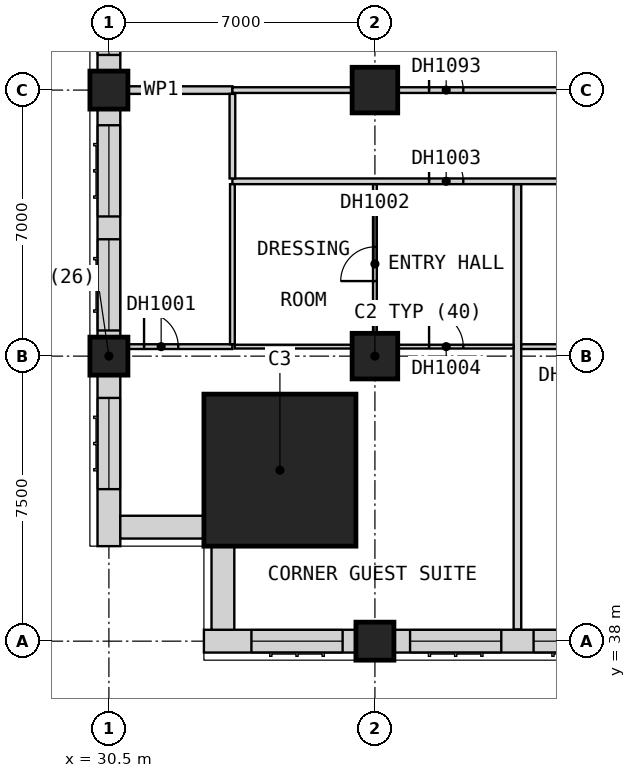
"""IFC4 building model, lengths in metres.
Left out: names, types, materials, properties, quantities, classifications, styles, units other than length and angle.
Written with IfcOpenShell. Run it as: python <this file> out.ifc"""

import sys

from ifc_helpers import new_model, si_unit, direction, frame, frame_2d, origin, origin_2d, place, context, subcontext, project, spatial, rectangle, extrude, element, fill, save


model = new_model("IFC4")
c1 = context("Model", 3, precision=1e-05, world=origin(), true_north=direction((0.0, 1.0)))
c2 = subcontext(c1, "Body", "Model", "MODEL_VIEW")
j1 = project(units=[si_unit("LENGTHUNIT", "METRE"), si_unit("PLANEANGLEUNIT", "RADIAN")], contexts=[c1])
p1 = place(None, origin())
s1 = spatial("IfcSite", under=j1, at=p1, CompositionType="ELEMENT")
p2 = place(p1, origin())
s2 = spatial("IfcBuilding", under=s1, at=p2, CompositionType="ELEMENT")
p3 = place(p2, frame((0.0, 0.0, 48.4)))
s3 = spatial("IfcBuildingStorey", under=s2, at=p3, CompositionType="ELEMENT", Elevation=48.4)
for number, where, z_axis, x_axis in (
    (1, (30.5, 45.5, 0.0), (0.0, 0.0, 1.0), (1.0, 0.0, 0.0)),
    (2, (30.5, 52.5, 0.0), (0.0, 0.0, 1.0), (1.0, 0.0, 0.0)),
    (3, (37.5, 38.0, 0.0), (0.0, 0.0, 1.0), (1.0, 0.0, 0.0)),
):
    element("IfcColumn", number, at=place(p3, frame(where, z_axis=z_axis, x_axis=x_axis)), inside=s3, PredefinedType="COLUMN", context=c2, shape_type="SweptSolid", body=[
        extrude(rectangle(XDim=1.0, YDim=1.0, at=origin_2d()), origin(), (0.0, 0.0, 1.0), 3.6),
    ])
for number, where, z_axis, x_axis in (
    (4, (37.5, 45.5, 0.0), (0.0, 0.0, 1.0), (1.0, 0.0, 0.0)),
    (5, (37.5, 52.5, 0.0), (0.0, 0.0, 1.0), (1.0, 0.0, 0.0)),
):
    element("IfcColumn", number, at=place(p3, frame(where, z_axis=z_axis, x_axis=x_axis)), inside=s3, PredefinedType="COLUMN", context=c2, shape_type="SweptSolid", body=[
        extrude(rectangle(XDim=1.2, YDim=1.2, at=origin_2d()), origin(), (0.0, 0.0, 1.0), 3.6),
    ])
p4 = place(p3, frame((35.0, 42.5, 0.0), z_axis=(0.0, 0.0, 1.0), x_axis=(1.0, 0.0, 0.0)))
e6 = element("IfcColumn", 6, at=p4, inside=s3, PredefinedType="COLUMN", context=c2, shape_type="SweptSolid", body=[
    extrude(rectangle(XDim=4.0, YDim=4.0, at=origin_2d()), origin(), (0.0, 0.0, 1.0), 3.6),
])
p5 = place(p3, frame((33.0, 38.0, 0.0), z_axis=(0.0, 0.0, 1.0), x_axis=(1.0, 0.0, 0.0)))
e7 = element("IfcWall", 7, at=p5, inside=s3, PredefinedType="SOLIDWALL", context=c2, shape_type="SweptSolid", body=[
    extrude(rectangle(XDim=4.0, YDim=0.6, at=frame_2d((2.0, 0.0))), origin(), (0.0, 0.0, 1.0), 3.35),
])
p6 = place(p5, frame((1.25, 0.0, 0.8)))
e8 = element("IfcOpeningElement", 8, at=p6, cuts=e7, PredefinedType="OPENING", context=c2, shape_type="SweptSolid", body=[
    extrude(rectangle(XDim=2.4, YDim=1.8, at=frame_2d((1.2, 0.9))), frame((0.0, 0.31, 0.0), z_axis=(0.0, -1.0, 0.0), x_axis=(1.0, 0.0, 0.0)), (0.0, 0.0, 1.0), 0.62),
])
p7 = place(p3, frame((38.0, 38.0, 0.0), z_axis=(0.0, 0.0, 1.0), x_axis=(1.0, 0.0, 0.0)))
e9 = element("IfcWall", 9, at=p7, inside=s3, PredefinedType="SOLIDWALL", context=c2, shape_type="SweptSolid", body=[
    extrude(rectangle(XDim=6.5, YDim=0.6, at=frame_2d((3.25, 0.0))), origin(), (0.0, 0.0, 1.0), 2.85),
])
p8 = place(p7, frame((0.425, 0.0, 0.8)))
e10 = element("IfcOpeningElement", 10, at=p8, cuts=e9, PredefinedType="OPENING", context=c2, shape_type="SweptSolid", body=[
    extrude(rectangle(XDim=2.4, YDim=1.8, at=frame_2d((1.2, 0.9))), frame((0.0, 0.31, 0.0), z_axis=(0.0, -1.0, 0.0), x_axis=(1.0, 0.0, 0.0)), (0.0, 0.0, 1.0), 0.62),
])
p9 = place(p7, frame((3.675, 0.0, 0.8)))
e11 = element("IfcOpeningElement", 11, at=p9, cuts=e9, PredefinedType="OPENING", context=c2, shape_type="SweptSolid", body=[
    extrude(rectangle(XDim=2.4, YDim=1.8, at=frame_2d((1.2, 0.9))), frame((0.0, 0.31, 0.0), z_axis=(0.0, -1.0, 0.0), x_axis=(1.0, 0.0, 0.0)), (0.0, 0.0, 1.0), 0.62),
])
p10 = place(p3, frame((30.5, 60.0, 0.0), z_axis=(0.0, 0.0, 1.0), x_axis=(0.0, -1.0, 0.0)))
e12 = element("IfcWall", 12, at=p10, inside=s3, PredefinedType="SOLIDWALL", context=c2, shape_type="SweptSolid", body=[
    extrude(rectangle(XDim=7.0, YDim=0.6, at=frame_2d((3.5, 0.0))), origin(), (0.0, 0.0, 1.0), 3.35),
])
p11 = place(p10, frame((4.175, 0.0, 0.8)))
e13 = element("IfcOpeningElement", 13, at=p11, cuts=e12, PredefinedType="OPENING", context=c2, shape_type="SweptSolid", body=[
    extrude(rectangle(XDim=2.4, YDim=1.8, at=frame_2d((1.2, 0.9))), frame((0.0, 0.31, 0.0), z_axis=(0.0, -1.0, 0.0), x_axis=(1.0, 0.0, 0.0)), (0.0, 0.0, 1.0), 0.62),
])
p12 = place(p10, frame((0.675, 0.0, 0.8)))
e14 = element("IfcOpeningElement", 14, at=p12, cuts=e12, PredefinedType="OPENING", context=c2, shape_type="SweptSolid", body=[
    extrude(rectangle(XDim=2.4, YDim=1.8, at=frame_2d((1.2, 0.9))), frame((0.0, 0.31, 0.0), z_axis=(0.0, -1.0, 0.0), x_axis=(1.0, 0.0, 0.0)), (0.0, 0.0, 1.0), 0.62),
])
p13 = place(p3, frame((30.5, 52.0, 0.0), z_axis=(0.0, 0.0, 1.0), x_axis=(0.0, -1.0, 0.0)))
e15 = element("IfcWall", 15, at=p13, inside=s3, PredefinedType="SOLIDWALL", context=c2, shape_type="SweptSolid", body=[
    extrude(rectangle(XDim=6.0, YDim=0.6, at=frame_2d((3.0, 0.0))), origin(), (0.0, 0.0, 1.0), 2.85),
])
p14 = place(p13, frame((3.425, 0.0, 0.8)))
e16 = element("IfcOpeningElement", 16, at=p14, cuts=e15, PredefinedType="OPENING", context=c2, shape_type="SweptSolid", body=[
    extrude(rectangle(XDim=2.4, YDim=1.8, at=frame_2d((1.2, 0.9))), frame((0.0, 0.31, 0.0), z_axis=(0.0, -1.0, 0.0), x_axis=(1.0, 0.0, 0.0)), (0.0, 0.0, 1.0), 0.62),
])
p15 = place(p13, frame((0.425, 0.0, 0.8)))
e17 = element("IfcOpeningElement", 17, at=p15, cuts=e15, PredefinedType="OPENING", context=c2, shape_type="SweptSolid", body=[
    extrude(rectangle(XDim=2.4, YDim=1.8, at=frame_2d((1.2, 0.9))), frame((0.0, 0.31, 0.0), z_axis=(0.0, -1.0, 0.0), x_axis=(1.0, 0.0, 0.0)), (0.0, 0.0, 1.0), 0.62),
])
p16 = place(p3, frame((30.5, 45.0, 0.0), z_axis=(0.0, 0.0, 1.0), x_axis=(0.0, -1.0, 0.0)))
e18 = element("IfcWall", 18, at=p16, inside=s3, PredefinedType="SOLIDWALL", context=c2, shape_type="SweptSolid", body=[
    extrude(rectangle(XDim=4.5, YDim=0.6, at=frame_2d((2.25, 0.0))), origin(), (0.0, 0.0, 1.0), 3.35),
])
p17 = place(p16, frame((0.6, 0.0, 0.8)))
e19 = element("IfcOpeningElement", 19, at=p17, cuts=e18, PredefinedType="OPENING", context=c2, shape_type="SweptSolid", body=[
    extrude(rectangle(XDim=2.4, YDim=1.8, at=frame_2d((1.2, 0.9))), frame((0.0, 0.31, 0.0), z_axis=(0.0, -1.0, 0.0), x_axis=(1.0, 0.0, 0.0)), (0.0, 0.0, 1.0), 0.62),
])
for number, where, z_axis, x_axis in (
    (20, (30.8, 41.0, 0.0), (0.0, 0.0, 1.0), (1.0, 0.0, 0.0)),
    (21, (33.5, 40.5, 0.0), (0.0, 0.0, 1.0), (0.0, -1.0, 0.0)),
):
    element("IfcWall", number, at=place(p3, frame(where, z_axis=z_axis, x_axis=x_axis)), inside=s3, PredefinedType="SOLIDWALL", context=c2, shape_type="SweptSolid", body=[
        extrude(rectangle(XDim=2.2, YDim=0.6, at=frame_2d((1.1, 0.0))), origin(), (0.0, 0.0, 1.0), 3.35),
    ])
p18 = place(p3, frame((30.0, 52.5, 0.0), z_axis=(0.0, 0.0, 1.0), x_axis=(1.0, 0.0, 0.0)))
e22 = element("IfcWall", 22, at=p18, inside=s3, PredefinedType="PARTITIONING", context=c2, shape_type="SweptSolid", body=[
    extrude(rectangle(XDim=3.75, YDim=0.2, at=frame_2d((1.875, 0.0))), origin(), (0.0, 0.0, 1.0), 3.35),
])
p19 = place(p3, frame((41.25, 38.31, 0.0), z_axis=(0.0, 0.0, 1.0), x_axis=(0.0, 1.0, 0.0)))
e23 = element("IfcWall", 23, at=p19, inside=s3, PredefinedType="PARTITIONING", context=c2, shape_type="SweptSolid", body=[
    extrude(rectangle(XDim=11.715, YDim=0.2, at=frame_2d((5.857, 0.0))), origin(), (0.0, 0.0, 1.0), 3.35),
])
p20 = place(p3, frame((33.75, 50.1, 0.0), z_axis=(0.0, 0.0, 1.0), x_axis=(1.0, 0.0, 0.0)))
e24 = element("IfcWall", 24, at=p20, inside=s3, PredefinedType="PARTITIONING", context=c2, shape_type="SweptSolid", body=[
    extrude(rectangle(XDim=43.65, YDim=0.15, at=frame_2d((21.825, 0.0))), origin(), (0.0, 0.0, 1.0), 3.35),
])
p21 = place(p20, frame((5.175, 0.0, 0.0)))
e25 = element("IfcOpeningElement", 25, at=p21, cuts=e24, PredefinedType="OPENING", context=c2, shape_type="SweptSolid", body=[
    extrude(rectangle(XDim=0.9, YDim=2.1, at=frame_2d((0.45, 1.05))), frame((0.0, 0.085, 0.0), z_axis=(0.0, -1.0, 0.0), x_axis=(1.0, 0.0, 0.0)), (0.0, 0.0, 1.0), 0.17),
])
p22 = place(p20, frame((13.05, 0.0, 0.0)))
e26 = element("IfcOpeningElement", 26, at=p22, cuts=e24, PredefinedType="OPENING", context=c2, shape_type="SweptSolid", body=[
    extrude(rectangle(XDim=0.9, YDim=2.1, at=frame_2d((0.45, 1.05))), frame((0.0, 0.085, 0.0), z_axis=(0.0, -1.0, 0.0), x_axis=(1.0, 0.0, 0.0)), (0.0, 0.0, 1.0), 0.17),
])
p23 = place(p20, frame((17.363, 0.0, 0.0)))
e27 = element("IfcOpeningElement", 27, at=p23, cuts=e24, PredefinedType="OPENING", context=c2, shape_type="SweptSolid", body=[
    extrude(rectangle(XDim=0.9, YDim=2.1, at=frame_2d((0.45, 1.05))), frame((0.0, 0.085, 0.0), z_axis=(0.0, -1.0, 0.0), x_axis=(1.0, 0.0, 0.0)), (0.0, 0.0, 1.0), 0.17),
])
p24 = place(p20, frame((21.113, 0.0, 0.0)))
e28 = element("IfcOpeningElement", 28, at=p24, cuts=e24, PredefinedType="OPENING", context=c2, shape_type="SweptSolid", body=[
    extrude(rectangle(XDim=0.9, YDim=2.1, at=frame_2d((0.45, 1.05))), frame((0.0, 0.085, 0.0), z_axis=(0.0, -1.0, 0.0), x_axis=(1.0, 0.0, 0.0)), (0.0, 0.0, 1.0), 0.17),
])
p25 = place(p20, frame((24.863, 0.0, 0.0)))
e29 = element("IfcOpeningElement", 29, at=p25, cuts=e24, PredefinedType="OPENING", context=c2, shape_type="SweptSolid", body=[
    extrude(rectangle(XDim=0.9, YDim=2.1, at=frame_2d((0.45, 1.05))), frame((0.0, 0.085, 0.0), z_axis=(0.0, -1.0, 0.0), x_axis=(1.0, 0.0, 0.0)), (0.0, 0.0, 1.0), 0.17),
])
p26 = place(p20, frame((28.613, 0.0, 0.0)))
e30 = element("IfcOpeningElement", 30, at=p26, cuts=e24, PredefinedType="OPENING", context=c2, shape_type="SweptSolid", body=[
    extrude(rectangle(XDim=0.9, YDim=2.1, at=frame_2d((0.45, 1.05))), frame((0.0, 0.085, 0.0), z_axis=(0.0, -1.0, 0.0), x_axis=(1.0, 0.0, 0.0)), (0.0, 0.0, 1.0), 0.17),
])
p27 = place(p20, frame((32.363, 0.0, 0.0)))
e31 = element("IfcOpeningElement", 31, at=p27, cuts=e24, PredefinedType="OPENING", context=c2, shape_type="SweptSolid", body=[
    extrude(rectangle(XDim=0.9, YDim=2.1, at=frame_2d((0.45, 1.05))), frame((0.0, 0.085, 0.0), z_axis=(0.0, -1.0, 0.0), x_axis=(1.0, 0.0, 0.0)), (0.0, 0.0, 1.0), 0.17),
])
p28 = place(p20, frame((39.3, 0.0, 0.0)))
e32 = element("IfcOpeningElement", 32, at=p28, cuts=e24, PredefinedType="OPENING", context=c2, shape_type="SweptSolid", body=[
    extrude(rectangle(XDim=0.9, YDim=2.1, at=frame_2d((0.45, 1.05))), frame((0.0, 0.085, 0.0), z_axis=(0.0, -1.0, 0.0), x_axis=(1.0, 0.0, 0.0)), (0.0, 0.0, 1.0), 0.17),
])
p29 = place(p20, frame((42.0, 0.0, 0.0)))
e33 = element("IfcOpeningElement", 33, at=p29, cuts=e24, PredefinedType="OPENING", context=c2, shape_type="SweptSolid", body=[
    extrude(rectangle(XDim=0.9, YDim=2.1, at=frame_2d((0.45, 1.05))), frame((0.0, 0.085, 0.0), z_axis=(0.0, -1.0, 0.0), x_axis=(1.0, 0.0, 0.0)), (0.0, 0.0, 1.0), 0.17),
])
p30 = place(p3, frame((33.75, 52.5, 0.0), z_axis=(0.0, 0.0, 1.0), x_axis=(1.0, 0.0, 0.0)))
e34 = element("IfcWall", 34, at=p30, inside=s3, PredefinedType="PARTITIONING", context=c2, shape_type="SweptSolid", body=[
    extrude(rectangle(XDim=17.15, YDim=0.15, at=frame_2d((8.575, 0.0))), origin(), (0.0, 0.0, 1.0), 3.35),
])
p31 = place(p30, frame((5.175, 0.0, 0.0)))
e35 = element("IfcOpeningElement", 35, at=p31, cuts=e34, PredefinedType="OPENING", context=c2, shape_type="SweptSolid", body=[
    extrude(rectangle(XDim=0.9, YDim=2.1, at=frame_2d((0.45, 1.05))), frame((0.0, 0.085, 0.0), z_axis=(0.0, -1.0, 0.0), x_axis=(1.0, 0.0, 0.0)), (0.0, 0.0, 1.0), 0.17),
])
p32 = place(p30, frame((13.75, 0.0, 0.0)))
e36 = element("IfcOpeningElement", 36, at=p32, cuts=e34, PredefinedType="OPENING", context=c2, shape_type="SweptSolid", body=[
    extrude(rectangle(XDim=0.9, YDim=2.1, at=frame_2d((0.45, 1.05))), frame((0.0, 0.085, 0.0), z_axis=(0.0, -1.0, 0.0), x_axis=(1.0, 0.0, 0.0)), (0.0, 0.0, 1.0), 0.17),
])
p33 = place(p3, frame((33.75, 50.175, 0.0), z_axis=(0.0, 0.0, 1.0), x_axis=(0.0, 1.0, 0.0)))
e37 = element("IfcWall", 37, at=p33, inside=s3, PredefinedType="PARTITIONING", context=c2, shape_type="SweptSolid", body=[
    extrude(rectangle(XDim=2.225, YDim=0.15, at=frame_2d((1.112, 0.0))), origin(), (0.0, 0.0, 1.0), 3.35),
])
p34 = place(p3, frame((33.812, 45.75, 0.0), z_axis=(0.0, 0.0, 1.0), x_axis=(1.0, 0.0, 0.0)))
e38 = element("IfcWall", 38, at=p34, inside=s3, PredefinedType="PARTITIONING", context=c2, shape_type="SweptSolid", body=[
    extrude(rectangle(XDim=7.337, YDim=0.1, at=frame_2d((3.669, 0.0))), origin(), (0.0, 0.0, 1.0), 3.35),
])
p35 = place(p34, frame((5.113, 0.0, 0.0)))
e39 = element("IfcOpeningElement", 39, at=p35, cuts=e38, PredefinedType="OPENING", context=c2, shape_type="SweptSolid", body=[
    extrude(rectangle(XDim=0.9, YDim=2.1, at=frame_2d((0.45, 1.05))), frame((0.0, 0.06, 0.0), z_axis=(0.0, -1.0, 0.0), x_axis=(1.0, 0.0, 0.0)), (0.0, 0.0, 1.0), 0.12),
])
p36 = place(p3, frame((37.5, 45.8, 0.0), z_axis=(0.0, 0.0, 1.0), x_axis=(0.0, 1.0, 0.0)))
e40 = element("IfcWall", 40, at=p36, inside=s3, PredefinedType="PARTITIONING", context=c2, shape_type="SweptSolid", body=[
    extrude(rectangle(XDim=4.225, YDim=0.1, at=frame_2d((2.112, 0.0))), origin(), (0.0, 0.0, 1.0), 3.35),
])
p37 = place(p36, frame((1.675, 0.0, 0.0)))
e41 = element("IfcOpeningElement", 41, at=p37, cuts=e40, PredefinedType="OPENING", context=c2, shape_type="SweptSolid", body=[
    extrude(rectangle(XDim=0.9, YDim=2.1, at=frame_2d((0.45, 1.05))), frame((0.0, 0.06, 0.0), z_axis=(0.0, -1.0, 0.0), x_axis=(1.0, 0.0, 0.0)), (0.0, 0.0, 1.0), 0.12),
])
p38 = place(p3, frame((30.0, 45.75, 0.0), z_axis=(0.0, 0.0, 1.0), x_axis=(1.0, 0.0, 0.0)))
e42 = element("IfcWall", 42, at=p38, inside=s3, PredefinedType="PARTITIONING", context=c2, shape_type="SweptSolid", body=[
    extrude(rectangle(XDim=3.75, YDim=0.125, at=frame_2d((1.875, 0.0))), origin(), (0.0, 0.0, 1.0), 3.35),
])
p39 = place(p38, frame((1.425, 0.0, 0.0)))
e43 = element("IfcOpeningElement", 43, at=p39, cuts=e42, PredefinedType="OPENING", context=c2, shape_type="SweptSolid", body=[
    extrude(rectangle(XDim=0.9, YDim=2.1, at=frame_2d((0.45, 1.05))), frame((0.0, 0.073, 0.0), z_axis=(0.0, -1.0, 0.0), x_axis=(1.0, 0.0, 0.0)), (0.0, 0.0, 1.0), 0.145),
])
p40 = place(p3, frame((41.35, 45.75, 0.0), z_axis=(0.0, 0.0, 1.0), x_axis=(1.0, 0.0, 0.0)))
e44 = element("IfcWall", 44, at=p40, inside=s3, PredefinedType="PARTITIONING", context=c2, shape_type="SweptSolid", body=[
    extrude(rectangle(XDim=4.4, YDim=0.125, at=frame_2d((2.2, 0.0))), origin(), (0.0, 0.0, 1.0), 3.35),
])
p41 = place(p40, frame((1.7, 0.0, 0.0)))
e45 = element("IfcOpeningElement", 45, at=p41, cuts=e44, PredefinedType="OPENING", context=c2, shape_type="SweptSolid", body=[
    extrude(rectangle(XDim=0.9, YDim=2.1, at=frame_2d((0.45, 1.05))), frame((0.0, 0.073, 0.0), z_axis=(0.0, -1.0, 0.0), x_axis=(1.0, 0.0, 0.0)), (0.0, 0.0, 1.0), 0.145),
])
p42 = place(p3, frame((33.75, 45.812, 0.0), z_axis=(0.0, 0.0, 1.0), x_axis=(0.0, 1.0, 0.0)))
e46 = element("IfcWall", 46, at=p42, inside=s3, PredefinedType="PARTITIONING", context=c2, shape_type="SweptSolid", body=[
    extrude(rectangle(XDim=4.212, YDim=0.125, at=frame_2d((2.106, 0.0))), origin(), (0.0, 0.0, 1.0), 3.35),
])
p43 = place(p6, origin())
e47 = element("IfcWindow", 47, at=p43, inside=s3, PartitioningType="SINGLE_PANEL", PredefinedType="WINDOW", context=c2, shape_type="SweptSolid", body=[
    extrude(rectangle(XDim=2.4, YDim=1.8, at=frame_2d((1.2, 0.9))), frame((0.0, -0.07, 0.0), z_axis=(0.0, -1.0, 0.0), x_axis=(1.0, 0.0, 0.0)), (0.0, 0.0, 1.0), 0.06),
])
fill(e8, e47)
p44 = place(p8, origin())
e48 = element("IfcWindow", 48, at=p44, inside=s3, PartitioningType="SINGLE_PANEL", PredefinedType="WINDOW", context=c2, shape_type="SweptSolid", body=[
    extrude(rectangle(XDim=2.4, YDim=1.8, at=frame_2d((1.2, 0.9))), frame((0.0, -0.07, 0.0), z_axis=(0.0, -1.0, 0.0), x_axis=(1.0, 0.0, 0.0)), (0.0, 0.0, 1.0), 0.06),
])
fill(e10, e48)
p45 = place(p9, origin())
e49 = element("IfcWindow", 49, at=p45, inside=s3, PartitioningType="SINGLE_PANEL", PredefinedType="WINDOW", context=c2, shape_type="SweptSolid", body=[
    extrude(rectangle(XDim=2.4, YDim=1.8, at=frame_2d((1.2, 0.9))), frame((0.0, -0.07, 0.0), z_axis=(0.0, -1.0, 0.0), x_axis=(1.0, 0.0, 0.0)), (0.0, 0.0, 1.0), 0.06),
])
fill(e11, e49)
p46 = place(p11, origin())
e50 = element("IfcWindow", 50, at=p46, inside=s3, PartitioningType="SINGLE_PANEL", PredefinedType="WINDOW", context=c2, shape_type="SweptSolid", body=[
    extrude(rectangle(XDim=2.4, YDim=1.8, at=frame_2d((1.2, 0.9))), frame((0.0, -0.07, 0.0), z_axis=(0.0, -1.0, 0.0), x_axis=(1.0, 0.0, 0.0)), (0.0, 0.0, 1.0), 0.06),
])
fill(e13, e50)
p47 = place(p14, origin())
e51 = element("IfcWindow", 51, at=p47, inside=s3, PartitioningType="SINGLE_PANEL", PredefinedType="WINDOW", context=c2, shape_type="SweptSolid", body=[
    extrude(rectangle(XDim=2.4, YDim=1.8, at=frame_2d((1.2, 0.9))), frame((0.0, -0.07, 0.0), z_axis=(0.0, -1.0, 0.0), x_axis=(1.0, 0.0, 0.0)), (0.0, 0.0, 1.0), 0.06),
])
fill(e16, e51)
p48 = place(p15, origin())
e52 = element("IfcWindow", 52, at=p48, inside=s3, PartitioningType="SINGLE_PANEL", PredefinedType="WINDOW", context=c2, shape_type="SweptSolid", body=[
    extrude(rectangle(XDim=2.4, YDim=1.8, at=frame_2d((1.2, 0.9))), frame((0.0, -0.07, 0.0), z_axis=(0.0, -1.0, 0.0), x_axis=(1.0, 0.0, 0.0)), (0.0, 0.0, 1.0), 0.06),
])
fill(e17, e52)
p49 = place(p17, origin())
e53 = element("IfcWindow", 53, at=p49, inside=s3, PartitioningType="SINGLE_PANEL", PredefinedType="WINDOW", context=c2, shape_type="SweptSolid", body=[
    extrude(rectangle(XDim=2.4, YDim=1.8, at=frame_2d((1.2, 0.9))), frame((0.0, -0.07, 0.0), z_axis=(0.0, -1.0, 0.0), x_axis=(1.0, 0.0, 0.0)), (0.0, 0.0, 1.0), 0.06),
])
fill(e19, e53)
p50 = place(p39, origin())
e54 = element("IfcDoor", 54, at=p50, inside=s3, OperationType="SINGLE_SWING_LEFT", PredefinedType="DOOR", context=c2, shape_type="SweptSolid", body=[
    extrude(rectangle(XDim=0.9, YDim=2.1, at=frame_2d((0.45, 1.05))), frame((0.0, 0.025, 0.0), z_axis=(0.0, -1.0, 0.0), x_axis=(1.0, 0.0, 0.0)), (0.0, 0.0, 1.0), 0.05),
])
fill(e43, e54)
p51 = place(p37, origin())
e55 = element("IfcDoor", 55, at=p51, inside=s3, OperationType="SINGLE_SWING_RIGHT", PredefinedType="DOOR", context=c2, shape_type="SweptSolid", body=[
    extrude(rectangle(XDim=0.9, YDim=2.1, at=frame_2d((0.45, 1.05))), frame((0.0, 0.025, 0.0), z_axis=(0.0, -1.0, 0.0), x_axis=(1.0, 0.0, 0.0)), (0.0, 0.0, 1.0), 0.05),
])
fill(e41, e55)
p52 = place(p21, origin())
e56 = element("IfcDoor", 56, at=p52, inside=s3, OperationType="SINGLE_SWING_RIGHT", PredefinedType="DOOR", context=c2, shape_type="SweptSolid", body=[
    extrude(rectangle(XDim=0.9, YDim=2.1, at=frame_2d((0.45, 1.05))), frame((0.0, 0.025, 0.0), z_axis=(0.0, -1.0, 0.0), x_axis=(1.0, 0.0, 0.0)), (0.0, 0.0, 1.0), 0.05),
])
fill(e25, e56)
p53 = place(p35, origin())
e57 = element("IfcDoor", 57, at=p53, inside=s3, OperationType="SINGLE_SWING_LEFT", PredefinedType="DOOR", context=c2, shape_type="SweptSolid", body=[
    extrude(rectangle(XDim=0.9, YDim=2.1, at=frame_2d((0.45, 1.05))), frame((0.0, 0.025, 0.0), z_axis=(0.0, -1.0, 0.0), x_axis=(1.0, 0.0, 0.0)), (0.0, 0.0, 1.0), 0.05),
])
fill(e39, e57)
p54 = place(p31, origin())
e58 = element("IfcDoor", 58, at=p54, inside=s3, OperationType="SINGLE_SWING_LEFT", PredefinedType="DOOR", context=c2, shape_type="SweptSolid", body=[
    extrude(rectangle(XDim=0.9, YDim=2.1, at=frame_2d((0.45, 1.05))), frame((0.0, 0.025, 0.0), z_axis=(0.0, -1.0, 0.0), x_axis=(1.0, 0.0, 0.0)), (0.0, 0.0, 1.0), 0.05),
])
fill(e35, e58)
save(model, sys.argv[1])
